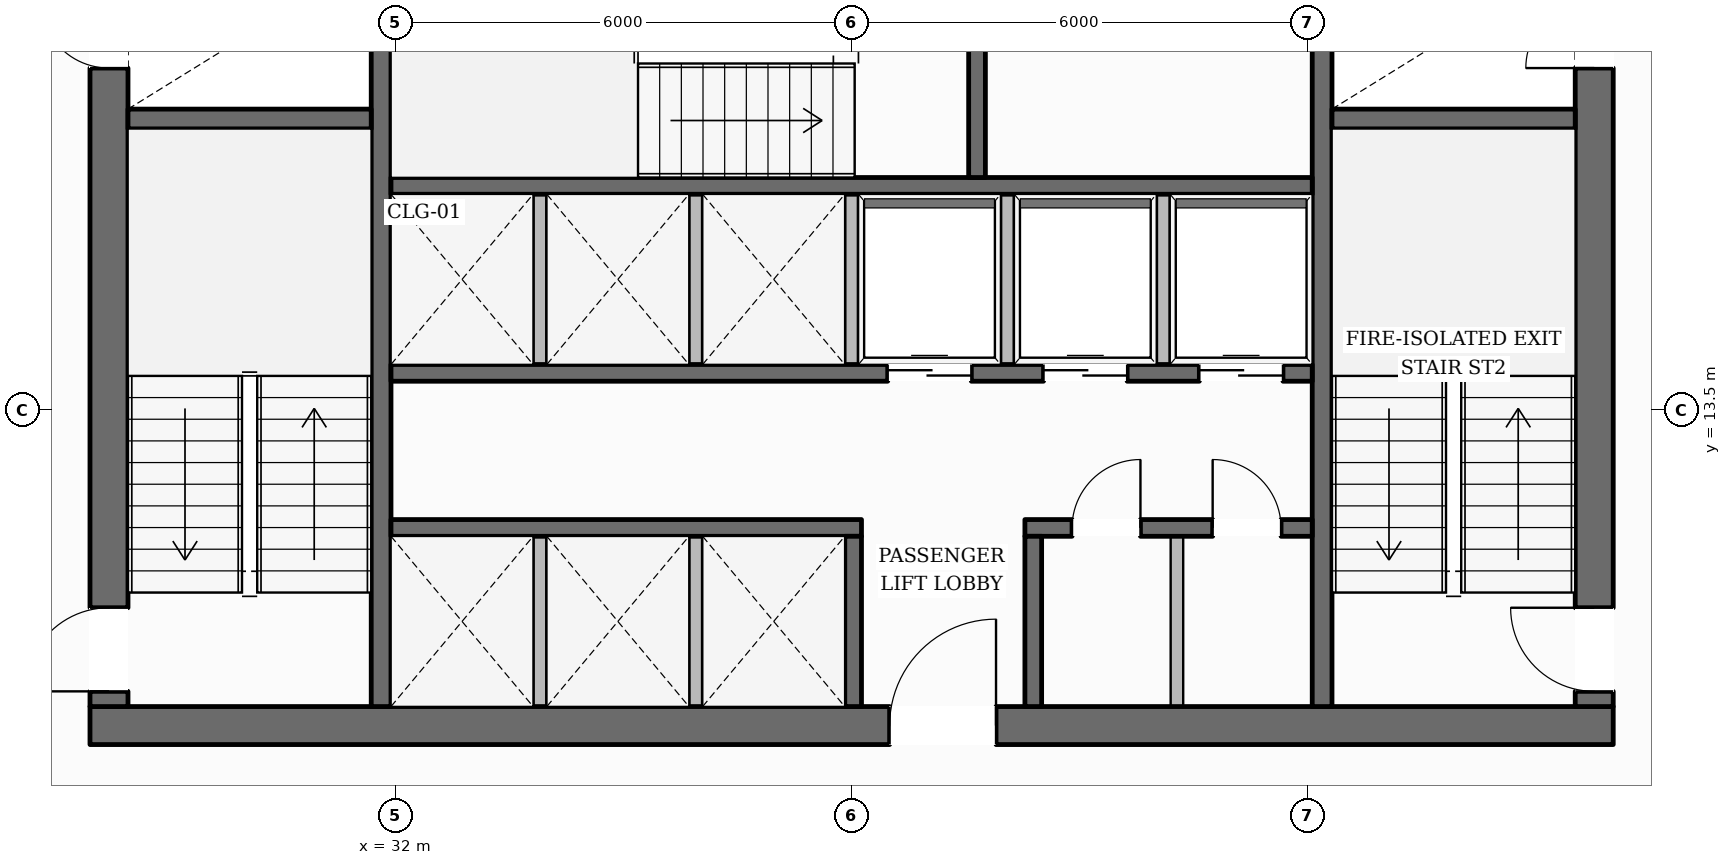
"""IFC4 building model, lengths in metres.
Left out: names, types, materials, properties, quantities, classifications, styles, units other than length and angle.
Written with IfcOpenShell. Run it as: python <this file> out.ifc"""

import sys

from ifc_helpers import new_model, si_unit, direction, frame, frame_2d, origin, place, context, subcontext, project, spatial, rectangle, extrude, element, fill, save


model = new_model("IFC4")
c1 = context("Model", 3, precision=1e-05, world=origin(), true_north=direction((0.0, 1.0)))
c2 = subcontext(c1, "Body", "Model", "MODEL_VIEW")
j1 = project(units=[si_unit("LENGTHUNIT", "METRE"), si_unit("PLANEANGLEUNIT", "RADIAN")], contexts=[c1])
p1 = place(None, origin())
s1 = spatial("IfcSite", under=j1, at=p1, CompositionType="ELEMENT")
p2 = place(p1, origin())
s2 = spatial("IfcBuilding", under=s1, at=p2, CompositionType="ELEMENT")
p3 = place(p2, frame((0.0, 0.0, 85.5)))
s3 = spatial("IfcBuildingStorey", under=s2, at=p3, CompositionType="ELEMENT", Elevation=85.5)
p4 = place(p3, frame((27.98, 9.35, 0.0), z_axis=(0.0, 0.0, 1.0), x_axis=(1.0, 0.0, 0.0)))
e1 = element("IfcWall", 1, at=p4, inside=s3, PredefinedType="SOLIDWALL", context=c2, shape_type="SweptSolid", body=[
    extrude(rectangle(XDim=20.04, YDim=0.5, at=frame_2d((10.02, 0.0))), origin(), (0.0, 0.0, 1.0), 3.6),
])
p5 = place(p4, frame((10.52, 0.0, 0.0)))
e2 = element("IfcOpeningElement", 2, at=p5, cuts=e1, PredefinedType="OPENING", context=c2, shape_type="SweptSolid", body=[
    extrude(rectangle(XDim=1.4, YDim=2.2, at=frame_2d((0.7, 1.1))), frame((0.0, 0.26, 0.0), z_axis=(0.0, -1.0, 0.0), x_axis=(1.0, 0.0, 0.0)), (0.0, 0.0, 1.0), 0.52),
])
p6 = place(p3, frame((28.23, 9.6, 0.0), z_axis=(0.0, 0.0, 1.0), x_axis=(0.0, 1.0, 0.0)))
e3 = element("IfcWall", 3, at=p6, inside=s3, PredefinedType="SOLIDWALL", context=c2, shape_type="SweptSolid", body=[
    extrude(rectangle(XDim=13.0, YDim=0.5, at=frame_2d((6.5, 0.0))), origin(), (0.0, 0.0, 1.0), 3.6),
])
p7 = place(p6, frame((0.2, 0.0, 0.0)))
e4 = element("IfcOpeningElement", 4, at=p7, cuts=e3, PredefinedType="OPENING", context=c2, shape_type="SweptSolid", body=[
    extrude(rectangle(XDim=1.1, YDim=2.15, at=frame_2d((0.55, 1.075))), frame((0.0, 0.26, 0.0), z_axis=(0.0, -1.0, 0.0), x_axis=(1.0, 0.0, 0.0)), (0.0, 0.0, 1.0), 0.52),
])
p8 = place(p6, frame((8.4, 0.0, 0.0)))
e5 = element("IfcOpeningElement", 5, at=p8, cuts=e3, PredefinedType="OPENING", context=c2, shape_type="SweptSolid", body=[
    extrude(rectangle(XDim=0.9, YDim=2.1, at=frame_2d((0.45, 1.05))), frame((0.0, 0.26, 0.0), z_axis=(0.0, -1.0, 0.0), x_axis=(1.0, 0.0, 0.0)), (0.0, 0.0, 1.0), 0.52),
])
p9 = place(p3, frame((47.77, 9.6, 0.0), z_axis=(0.0, 0.0, 1.0), x_axis=(0.0, 1.0, 0.0)))
e6 = element("IfcWall", 6, at=p9, inside=s3, PredefinedType="SOLIDWALL", context=c2, shape_type="SweptSolid", body=[
    extrude(rectangle(XDim=13.0, YDim=0.5, at=frame_2d((6.5, 0.0))), origin(), (0.0, 0.0, 1.0), 3.6),
])
p10 = place(p9, frame((0.2, 0.0, 0.0)))
e7 = element("IfcOpeningElement", 7, at=p10, cuts=e6, PredefinedType="OPENING", context=c2, shape_type="SweptSolid", body=[
    extrude(rectangle(XDim=1.1, YDim=2.15, at=frame_2d((0.55, 1.075))), frame((0.0, 0.26, 0.0), z_axis=(0.0, -1.0, 0.0), x_axis=(1.0, 0.0, 0.0)), (0.0, 0.0, 1.0), 0.52),
])
p11 = place(p9, frame((8.4, 0.0, 0.0)))
e8 = element("IfcOpeningElement", 8, at=p11, cuts=e6, PredefinedType="OPENING", context=c2, shape_type="SweptSolid", body=[
    extrude(rectangle(XDim=0.9, YDim=2.1, at=frame_2d((0.45, 1.05))), frame((0.0, 0.26, 0.0), z_axis=(0.0, -1.0, 0.0), x_axis=(1.0, 0.0, 0.0)), (0.0, 0.0, 1.0), 0.52),
])
p12 = place(p3, frame((31.81, 9.6, 0.0), z_axis=(0.0, 0.0, 1.0), x_axis=(0.0, 1.0, 0.0)))
e9 = element("IfcWall", 9, at=p12, inside=s3, PredefinedType="SHEAR", context=c2, shape_type="SweptSolid", body=[
    extrude(rectangle(XDim=13.0, YDim=0.26, at=frame_2d((6.5, 0.0))), origin(), (0.0, 0.0, 1.0), 3.6),
])
p13 = place(p12, frame((10.925, 0.0, 0.0)))
e10 = element("IfcOpeningElement", 10, at=p13, cuts=e9, PredefinedType="OPENING", context=c2, shape_type="SweptSolid", body=[
    extrude(rectangle(XDim=1.25, YDim=2.25, at=frame_2d((0.625, 1.125))), frame((0.0, 0.14, 0.0), z_axis=(0.0, -1.0, 0.0), x_axis=(1.0, 0.0, 0.0)), (0.0, 0.0, 1.0), 0.28),
])
p14 = place(p3, frame((44.19, 9.6, 0.0), z_axis=(0.0, 0.0, 1.0), x_axis=(0.0, 1.0, 0.0)))
e11 = element("IfcWall", 11, at=p14, inside=s3, PredefinedType="SHEAR", context=c2, shape_type="SweptSolid", body=[
    extrude(rectangle(XDim=13.0, YDim=0.26, at=frame_2d((6.5, 0.0))), origin(), (0.0, 0.0, 1.0), 3.6),
])
p15 = place(p14, frame((10.925, 0.0, 0.0)))
e12 = element("IfcOpeningElement", 12, at=p15, cuts=e11, PredefinedType="OPENING", context=c2, shape_type="SweptSolid", body=[
    extrude(rectangle(XDim=1.25, YDim=2.25, at=frame_2d((0.625, 1.125))), frame((0.0, 0.14, 0.0), z_axis=(0.0, -1.0, 0.0), x_axis=(1.0, 0.0, 0.0)), (0.0, 0.0, 1.0), 0.28),
])
for number, where, z_axis, x_axis in (
    (13, (28.48, 17.33, 0.0), (0.0, 0.0, 1.0), (1.0, 0.0, 0.0)),
    (14, (44.32, 17.33, 0.0), (0.0, 0.0, 1.0), (1.0, 0.0, 0.0)),
):
    element("IfcWall", number, at=place(p3, frame(where, z_axis=z_axis, x_axis=x_axis)), inside=s3, PredefinedType="SHEAR", context=c2, shape_type="SweptSolid", body=[
        extrude(rectangle(XDim=3.2, YDim=0.26, at=frame_2d((1.6, 0.0))), origin(), (0.0, 0.0, 1.0), 3.6),
    ])
p16 = place(p3, frame((31.94, 16.45, 0.0), z_axis=(0.0, 0.0, 1.0), x_axis=(1.0, 0.0, 0.0)))
e15 = element("IfcWall", 15, at=p16, inside=s3, PredefinedType="SOLIDWALL", context=c2, shape_type="SweptSolid", body=[
    extrude(rectangle(XDim=12.12, YDim=0.22, at=frame_2d((6.06, 0.0))), origin(), (0.0, 0.0, 1.0), 3.6),
])
p17 = place(p3, frame((39.65, 16.56, 0.0), z_axis=(0.0, 0.0, 1.0), x_axis=(0.0, 1.0, 0.0)))
e16 = element("IfcWall", 16, at=p17, inside=s3, PredefinedType="SOLIDWALL", context=c2, shape_type="SweptSolid", body=[
    extrude(rectangle(XDim=3.2, YDim=0.22, at=frame_2d((1.6, 0.0))), origin(), (0.0, 0.0, 1.0), 3.6),
])
p18 = place(p3, frame((31.94, 13.99, 0.0), z_axis=(0.0, 0.0, 1.0), x_axis=(1.0, 0.0, 0.0)))
e17 = element("IfcWall", 17, at=p18, inside=s3, PredefinedType="SOLIDWALL", context=c2, shape_type="SweptSolid", body=[
    extrude(rectangle(XDim=12.12, YDim=0.22, at=frame_2d((6.06, 0.0))), origin(), (0.0, 0.0, 1.0), 3.6),
])
p19 = place(p18, frame((6.535, 0.0, 0.0)))
e18 = element("IfcOpeningElement", 18, at=p19, cuts=e17, PredefinedType="OPENING", context=c2, shape_type="SweptSolid", body=[
    extrude(rectangle(XDim=1.1, YDim=2.2, at=frame_2d((0.55, 1.1))), frame((0.0, 0.12, 0.0), z_axis=(0.0, -1.0, 0.0), x_axis=(1.0, 0.0, 0.0)), (0.0, 0.0, 1.0), 0.24),
])
p20 = place(p18, frame((8.585, 0.0, 0.0)))
e19 = element("IfcOpeningElement", 19, at=p20, cuts=e17, PredefinedType="OPENING", context=c2, shape_type="SweptSolid", body=[
    extrude(rectangle(XDim=1.1, YDim=2.2, at=frame_2d((0.55, 1.1))), frame((0.0, 0.12, 0.0), z_axis=(0.0, -1.0, 0.0), x_axis=(1.0, 0.0, 0.0)), (0.0, 0.0, 1.0), 0.24),
])
p21 = place(p18, frame((10.635, 0.0, 0.0)))
e20 = element("IfcOpeningElement", 20, at=p21, cuts=e17, PredefinedType="OPENING", context=c2, shape_type="SweptSolid", body=[
    extrude(rectangle(XDim=1.1, YDim=2.2, at=frame_2d((0.55, 1.1))), frame((0.0, 0.12, 0.0), z_axis=(0.0, -1.0, 0.0), x_axis=(1.0, 0.0, 0.0)), (0.0, 0.0, 1.0), 0.24),
])
p22 = place(p3, frame((31.94, 11.95, 0.0), z_axis=(0.0, 0.0, 1.0), x_axis=(1.0, 0.0, 0.0)))
e21 = element("IfcWall", 21, at=p22, inside=s3, PredefinedType="SOLIDWALL", context=c2, shape_type="SweptSolid", body=[
    extrude(rectangle(XDim=6.19, YDim=0.22, at=frame_2d((3.095, 0.0))), origin(), (0.0, 0.0, 1.0), 3.6),
])
p23 = place(p3, frame((40.28, 11.95, 0.0), z_axis=(0.0, 0.0, 1.0), x_axis=(1.0, 0.0, 0.0)))
e22 = element("IfcWall", 22, at=p23, inside=s3, PredefinedType="SOLIDWALL", context=c2, shape_type="SweptSolid", body=[
    extrude(rectangle(XDim=3.78, YDim=0.22, at=frame_2d((1.89, 0.0))), origin(), (0.0, 0.0, 1.0), 3.6),
])
p24 = place(p23, frame((0.62, 0.0, 0.0)))
e23 = element("IfcOpeningElement", 23, at=p24, cuts=e22, PredefinedType="OPENING", context=c2, shape_type="SweptSolid", body=[
    extrude(rectangle(XDim=0.9, YDim=2.1, at=frame_2d((0.45, 1.05))), frame((0.0, 0.12, 0.0), z_axis=(0.0, -1.0, 0.0), x_axis=(1.0, 0.0, 0.0)), (0.0, 0.0, 1.0), 0.24),
])
p25 = place(p23, frame((2.47, 0.0, 0.0)))
e24 = element("IfcOpeningElement", 24, at=p25, cuts=e22, PredefinedType="OPENING", context=c2, shape_type="SweptSolid", body=[
    extrude(rectangle(XDim=0.9, YDim=2.1, at=frame_2d((0.45, 1.05))), frame((0.0, 0.12, 0.0), z_axis=(0.0, -1.0, 0.0), x_axis=(1.0, 0.0, 0.0)), (0.0, 0.0, 1.0), 0.24),
])
for number, where, z_axis, x_axis in (
    (25, (38.02, 9.6, 0.0), (0.0, 0.0, 1.0), (0.0, 1.0, 0.0)),
    (26, (40.39, 9.6, 0.0), (0.0, 0.0, 1.0), (0.0, 1.0, 0.0)),
):
    element("IfcWall", number, at=place(p3, frame(where, z_axis=z_axis, x_axis=x_axis)), inside=s3, PredefinedType="SOLIDWALL", context=c2, shape_type="SweptSolid", body=[
        extrude(rectangle(XDim=2.24, YDim=0.22, at=frame_2d((1.12, 0.0))), origin(), (0.0, 0.0, 1.0), 3.6),
    ])
p26 = place(p3, frame((13.817, 13.509, 0.0), z_axis=(0.0, 0.0, 1.0), x_axis=(0.498436356308, 0.866926293701, 0.0)))
e27 = element("IfcWall", 27, at=p26, inside=s3, PredefinedType="STANDARD", context=c2, shape_type="SweptSolid", body=[
    extrude(rectangle(XDim=35.622, YDim=0.38, at=frame_2d((17.811, 0.0))), origin(), (0.0, 0.0, 1.0), 3.059),
])
p27 = place(p26, frame((31.481, 0.0, 0.65)))
e28 = element("IfcOpeningElement", 28, at=p27, cuts=e27, PredefinedType="OPENING", context=c2, shape_type="SweptSolid", body=[
    extrude(rectangle(XDim=1.55, YDim=1.75, at=frame_2d((0.775, 0.875))), frame((0.0, 0.2, 0.0), z_axis=(0.0, -1.0, 0.0), x_axis=(1.0, 0.0, 0.0)), (0.0, 0.0, 1.0), 0.4),
])
p28 = place(p26, frame((25.703, 0.0, 0.65)))
e29 = element("IfcOpeningElement", 29, at=p28, cuts=e27, PredefinedType="OPENING", context=c2, shape_type="SweptSolid", body=[
    extrude(rectangle(XDim=1.55, YDim=1.75, at=frame_2d((0.775, 0.875))), frame((0.0, 0.2, 0.0), z_axis=(0.0, -1.0, 0.0), x_axis=(1.0, 0.0, 0.0)), (0.0, 0.0, 1.0), 0.4),
])
p29 = place(p26, frame((14.146, 0.0, 0.65)))
e30 = element("IfcOpeningElement", 30, at=p29, cuts=e27, PredefinedType="OPENING", context=c2, shape_type="SweptSolid", body=[
    extrude(rectangle(XDim=1.55, YDim=1.75, at=frame_2d((0.775, 0.875))), frame((0.0, 0.2, 0.0), z_axis=(0.0, -1.0, 0.0), x_axis=(1.0, 0.0, 0.0)), (0.0, 0.0, 1.0), 0.4),
])
p30 = place(p26, frame((8.367, 0.0, 0.65)))
e31 = element("IfcOpeningElement", 31, at=p30, cuts=e27, PredefinedType="OPENING", context=c2, shape_type="SweptSolid", body=[
    extrude(rectangle(XDim=1.55, YDim=1.75, at=frame_2d((0.775, 0.875))), frame((0.0, 0.2, 0.0), z_axis=(0.0, -1.0, 0.0), x_axis=(1.0, 0.0, 0.0)), (0.0, 0.0, 1.0), 0.4),
])
p31 = place(p26, frame((2.589, 0.0, 0.65)))
e32 = element("IfcOpeningElement", 32, at=p31, cuts=e27, PredefinedType="OPENING", context=c2, shape_type="SweptSolid", body=[
    extrude(rectangle(XDim=1.55, YDim=1.75, at=frame_2d((0.775, 0.875))), frame((0.0, 0.2, 0.0), z_axis=(0.0, -1.0, 0.0), x_axis=(1.0, 0.0, 0.0)), (0.0, 0.0, 1.0), 0.4),
])
p32 = place(p3, frame((44.314, 44.458, 0.0), z_axis=(0.0, 0.0, 1.0), x_axis=(0.494118179016, -0.869394746456, 0.0)))
e33 = element("IfcWall", 33, at=p32, inside=s3, PredefinedType="STANDARD", context=c2, shape_type="SweptSolid", body=[
    extrude(rectangle(XDim=35.322, YDim=0.38, at=frame_2d((17.661, 0.0))), origin(), (0.0, 0.0, 1.0), 3.059),
])
p33 = place(p32, frame((31.209, 0.0, 0.65)))
e34 = element("IfcOpeningElement", 34, at=p33, cuts=e33, PredefinedType="OPENING", context=c2, shape_type="SweptSolid", body=[
    extrude(rectangle(XDim=1.55, YDim=1.75, at=frame_2d((0.775, 0.875))), frame((0.0, 0.2, 0.0), z_axis=(0.0, -1.0, 0.0), x_axis=(1.0, 0.0, 0.0)), (0.0, 0.0, 1.0), 0.4),
])
p34 = place(p32, frame((25.481, 0.0, 0.65)))
e35 = element("IfcOpeningElement", 35, at=p34, cuts=e33, PredefinedType="OPENING", context=c2, shape_type="SweptSolid", body=[
    extrude(rectangle(XDim=1.55, YDim=1.75, at=frame_2d((0.775, 0.875))), frame((0.0, 0.2, 0.0), z_axis=(0.0, -1.0, 0.0), x_axis=(1.0, 0.0, 0.0)), (0.0, 0.0, 1.0), 0.4),
])
p35 = place(p32, frame((14.025, 0.0, 0.65)))
e36 = element("IfcOpeningElement", 36, at=p35, cuts=e33, PredefinedType="OPENING", context=c2, shape_type="SweptSolid", body=[
    extrude(rectangle(XDim=1.55, YDim=1.75, at=frame_2d((0.775, 0.875))), frame((0.0, 0.2, 0.0), z_axis=(0.0, -1.0, 0.0), x_axis=(1.0, 0.0, 0.0)), (0.0, 0.0, 1.0), 0.4),
])
p36 = place(p32, frame((8.298, 0.0, 0.65)))
e37 = element("IfcOpeningElement", 37, at=p36, cuts=e33, PredefinedType="OPENING", context=c2, shape_type="SweptSolid", body=[
    extrude(rectangle(XDim=1.55, YDim=1.75, at=frame_2d((0.775, 0.875))), frame((0.0, 0.2, 0.0), z_axis=(0.0, -1.0, 0.0), x_axis=(1.0, 0.0, 0.0)), (0.0, 0.0, 1.0), 0.4),
])
p37 = place(p32, frame((2.57, 0.0, 0.65)))
e38 = element("IfcOpeningElement", 38, at=p37, cuts=e33, PredefinedType="OPENING", context=c2, shape_type="SweptSolid", body=[
    extrude(rectangle(XDim=1.55, YDim=1.75, at=frame_2d((0.775, 0.875))), frame((0.0, 0.2, 0.0), z_axis=(0.0, -1.0, 0.0), x_axis=(1.0, 0.0, 0.0)), (0.0, 0.0, 1.0), 0.4),
])
for number, where, z_axis, x_axis in (
    (39, (33.9, 9.55, 0.0), (0.0, 0.0, 1.0), (0.0, 1.0, 0.0)),
    (40, (35.95, 9.55, 0.0), (0.0, 0.0, 1.0), (0.0, 1.0, 0.0)),
):
    element("IfcWall", number, at=place(p3, frame(where, z_axis=z_axis, x_axis=x_axis)), inside=s3, PredefinedType="PARTITIONING", context=c2, shape_type="SweptSolid", body=[
        extrude(rectangle(XDim=2.29, YDim=0.165, at=frame_2d((1.145, 0.0))), origin(), (0.0, 0.0, 1.0), 3.6),
    ])
for number, where, z_axis, x_axis in (
    (41, (33.9, 14.1, 0.0), (0.0, 0.0, 1.0), (0.0, 1.0, 0.0)),
    (42, (35.95, 14.1, 0.0), (0.0, 0.0, 1.0), (0.0, 1.0, 0.0)),
    (43, (38.0, 14.1, 0.0), (0.0, 0.0, 1.0), (0.0, 1.0, 0.0)),
    (44, (40.05, 14.1, 0.0), (0.0, 0.0, 1.0), (0.0, 1.0, 0.0)),
    (45, (42.1, 14.1, 0.0), (0.0, 0.0, 1.0), (0.0, 1.0, 0.0)),
):
    element("IfcWall", number, at=place(p3, frame(where, z_axis=z_axis, x_axis=x_axis)), inside=s3, PredefinedType="PARTITIONING", context=c2, shape_type="SweptSolid", body=[
        extrude(rectangle(XDim=2.24, YDim=0.165, at=frame_2d((1.12, 0.0))), origin(), (0.0, 0.0, 1.0), 3.6),
    ])
p38 = place(p3, frame((42.28, 9.55, 0.0), z_axis=(0.0, 0.0, 1.0), x_axis=(0.0, 1.0, 0.0)))
e46 = element("IfcWall", 46, at=p38, inside=s3, PredefinedType="PARTITIONING", context=c2, shape_type="SweptSolid", body=[
    extrude(rectangle(XDim=2.29, YDim=0.165, at=frame_2d((1.145, 0.0))), origin(), (0.0, 0.0, 1.0), 3.6),
])
p39 = place(p7, origin())
e47 = element("IfcDoor", 47, at=p39, inside=s3, OperationType="SINGLE_SWING_LEFT", PredefinedType="DOOR", context=c2, shape_type="SweptSolid", body=[
    extrude(rectangle(XDim=1.1, YDim=2.15, at=frame_2d((0.55, 1.075))), frame((0.0, 0.025, 0.0), z_axis=(0.0, -1.0, 0.0), x_axis=(1.0, 0.0, 0.0)), (0.0, 0.0, 1.0), 0.05),
])
fill(e4, e47)
p40 = place(p10, origin())
e48 = element("IfcDoor", 48, at=p40, inside=s3, OperationType="SINGLE_SWING_RIGHT", PredefinedType="DOOR", context=c2, shape_type="SweptSolid", body=[
    extrude(rectangle(XDim=1.1, YDim=2.15, at=frame_2d((0.55, 1.075))), frame((0.0, 0.025, 0.0), z_axis=(0.0, -1.0, 0.0), x_axis=(1.0, 0.0, 0.0)), (0.0, 0.0, 1.0), 0.05),
])
fill(e7, e48)
p41 = place(p8, origin())
e49 = element("IfcDoor", 49, at=p41, inside=s3, OperationType="SINGLE_SWING_RIGHT", PredefinedType="DOOR", context=c2, shape_type="SweptSolid", body=[
    extrude(rectangle(XDim=0.9, YDim=2.1, at=frame_2d((0.45, 1.05))), frame((0.0, 0.025, 0.0), z_axis=(0.0, -1.0, 0.0), x_axis=(1.0, 0.0, 0.0)), (0.0, 0.0, 1.0), 0.05),
])
fill(e5, e49)
p42 = place(p11, origin())
e50 = element("IfcDoor", 50, at=p42, inside=s3, OperationType="SINGLE_SWING_LEFT", PredefinedType="DOOR", context=c2, shape_type="SweptSolid", body=[
    extrude(rectangle(XDim=0.9, YDim=2.1, at=frame_2d((0.45, 1.05))), frame((0.0, 0.025, 0.0), z_axis=(0.0, -1.0, 0.0), x_axis=(1.0, 0.0, 0.0)), (0.0, 0.0, 1.0), 0.05),
])
fill(e8, e50)
p43 = place(p5, origin())
e51 = element("IfcDoor", 51, at=p43, inside=s3, OperationType="SINGLE_SWING_RIGHT", PredefinedType="DOOR", context=c2, shape_type="SweptSolid", body=[
    extrude(rectangle(XDim=1.4, YDim=2.2, at=frame_2d((0.7, 1.1))), frame((0.0, 0.025, 0.0), z_axis=(0.0, -1.0, 0.0), x_axis=(1.0, 0.0, 0.0)), (0.0, 0.0, 1.0), 0.05),
])
fill(e2, e51)
p44 = place(p19, origin())
e52 = element("IfcDoor", 52, at=p44, inside=s3, OperationType="DOUBLE_DOOR_SLIDING", PredefinedType="DOOR", context=c2, shape_type="SweptSolid", body=[
    extrude(rectangle(XDim=1.1, YDim=2.2, at=frame_2d((0.55, 1.1))), frame((0.0, 0.025, 0.0), z_axis=(0.0, -1.0, 0.0), x_axis=(1.0, 0.0, 0.0)), (0.0, 0.0, 1.0), 0.05),
])
fill(e18, e52)
p45 = place(p20, origin())
e53 = element("IfcDoor", 53, at=p45, inside=s3, OperationType="DOUBLE_DOOR_SLIDING", PredefinedType="DOOR", context=c2, shape_type="SweptSolid", body=[
    extrude(rectangle(XDim=1.1, YDim=2.2, at=frame_2d((0.55, 1.1))), frame((0.0, 0.025, 0.0), z_axis=(0.0, -1.0, 0.0), x_axis=(1.0, 0.0, 0.0)), (0.0, 0.0, 1.0), 0.05),
])
fill(e19, e53)
p46 = place(p21, origin())
e54 = element("IfcDoor", 54, at=p46, inside=s3, OperationType="DOUBLE_DOOR_SLIDING", PredefinedType="DOOR", context=c2, shape_type="SweptSolid", body=[
    extrude(rectangle(XDim=1.1, YDim=2.2, at=frame_2d((0.55, 1.1))), frame((0.0, 0.025, 0.0), z_axis=(0.0, -1.0, 0.0), x_axis=(1.0, 0.0, 0.0)), (0.0, 0.0, 1.0), 0.05),
])
fill(e20, e54)
p47 = place(p24, origin())
e55 = element("IfcDoor", 55, at=p47, inside=s3, OperationType="SINGLE_SWING_RIGHT", PredefinedType="DOOR", context=c2, shape_type="SweptSolid", body=[
    extrude(rectangle(XDim=0.9, YDim=2.1, at=frame_2d((0.45, 1.05))), frame((0.0, 0.025, 0.0), z_axis=(0.0, -1.0, 0.0), x_axis=(1.0, 0.0, 0.0)), (0.0, 0.0, 1.0), 0.05),
])
fill(e23, e55)
p48 = place(p25, origin())
e56 = element("IfcDoor", 56, at=p48, inside=s3, OperationType="SINGLE_SWING_LEFT", PredefinedType="DOOR", context=c2, shape_type="SweptSolid", body=[
    extrude(rectangle(XDim=0.9, YDim=2.1, at=frame_2d((0.45, 1.05))), frame((0.0, 0.025, 0.0), z_axis=(0.0, -1.0, 0.0), x_axis=(1.0, 0.0, 0.0)), (0.0, 0.0, 1.0), 0.05),
])
fill(e24, e56)
save(model, sys.argv[1])
